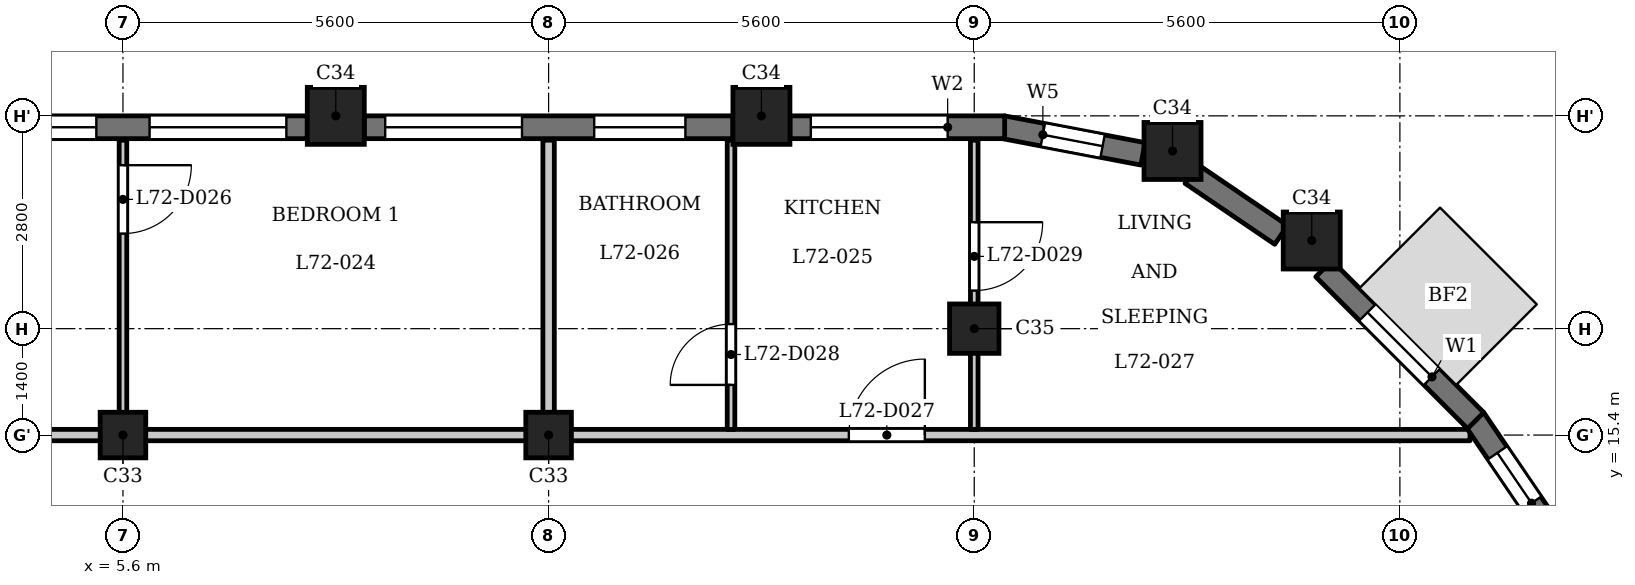
"""IFC4 building model, lengths in metres.
Left out: names, types, materials, properties, quantities, classifications, styles, units other than length and angle.
Written with IfcOpenShell. Run it as: python <this file> out.ifc"""

import sys

from ifc_helpers import new_model, si_unit, direction, frame, frame_2d, origin, origin_2d, place, context, subcontext, project, spatial, rectangle, extrude, element, fill, save


model = new_model("IFC4")
c1 = context("Model", 3, precision=1e-05, world=origin(), true_north=direction((0.0, 1.0)))
c2 = subcontext(c1, "Body", "Model", "MODEL_VIEW")
j1 = project(units=[si_unit("LENGTHUNIT", "METRE"), si_unit("PLANEANGLEUNIT", "RADIAN")], contexts=[c1])
p1 = place(None, origin())
s1 = spatial("IfcSite", under=j1, at=p1, CompositionType="ELEMENT")
p2 = place(p1, origin())
s2 = spatial("IfcBuilding", under=s1, at=p2, CompositionType="ELEMENT")
p3 = place(p2, frame((0.0, 0.0, 276.7)))
s3 = spatial("IfcBuildingStorey", under=s2, at=p3, CompositionType="ELEMENT", Elevation=276.7)
for number, where, z_axis, x_axis in (
    (1, (21.24, 17.96, 0.0), (0.0, 0.0, 1.0), (1.0, 0.0, 0.0)),
    (2, (19.409, 19.138, 0.0), (0.0, 0.0, 1.0), (1.0, 0.0, 0.0)),
    (3, (14.0, 19.6, 0.0), (0.0, 0.0, 1.0), (1.0, 0.0, 0.0)),
    (4, (8.4, 19.6, 0.0), (0.0, 0.0, 1.0), (1.0, 0.0, 0.0)),
):
    element("IfcColumn", number, at=place(p3, frame(where, z_axis=z_axis, x_axis=x_axis)), inside=s3, PredefinedType="COLUMN", context=c2, shape_type="SweptSolid", body=[
        extrude(rectangle(XDim=0.75, YDim=0.75, at=origin_2d()), origin(), (0.0, 0.0, 1.0), 3.5),
    ])
p4 = place(p3, frame((16.8, 16.8, 0.0), z_axis=(0.0, 0.0, 1.0), x_axis=(1.0, 0.0, 0.0)))
e5 = element("IfcColumn", 5, at=p4, inside=s3, PredefinedType="COLUMN", context=c2, shape_type="SweptSolid", body=[
    extrude(rectangle(XDim=0.65, YDim=0.65, at=origin_2d()), origin(), (0.0, 0.0, 1.0), 3.5),
])
for number, where, z_axis, x_axis in (
    (6, (5.6, 15.4, 0.0), (0.0, 0.0, 1.0), (1.0, 0.0, 0.0)),
    (7, (11.2, 15.4, 0.0), (0.0, 0.0, 1.0), (1.0, 0.0, 0.0)),
):
    element("IfcColumn", number, at=place(p3, frame(where, z_axis=z_axis, x_axis=x_axis)), inside=s3, PredefinedType="COLUMN", context=c2, shape_type="SweptSolid", body=[
        extrude(rectangle(XDim=0.6, YDim=0.6, at=origin_2d()), origin(), (0.0, 0.0, 1.0), 3.5),
    ])
p5 = place(p3, frame((24.436, 14.057, 0.0), z_axis=(0.0, 0.0, 1.0), x_axis=(-0.562075713892, 0.827085782645, 0.0)))
e8 = element("IfcWall", 8, at=p5, inside=s3, PredefinedType="SOLIDWALL", context=c2, shape_type="SweptSolid", body=[
    extrude(rectangle(XDim=1.881, YDim=0.3, at=frame_2d((0.94, 0.0))), origin(), (0.0, 0.0, 1.0), 2.55),
])
p6 = place(p5, frame((0.541, 0.0, 0.6)))
e9 = element("IfcOpeningElement", 9, at=p6, cuts=e8, PredefinedType="OPENING", context=c2, shape_type="SweptSolid", body=[
    extrude(rectangle(XDim=0.8, YDim=1.55, at=frame_2d((0.4, 0.775))), frame((0.0, 0.16, 0.0), z_axis=(0.0, -1.0, 0.0), x_axis=(1.0, 0.0, 0.0)), (0.0, 0.0, 1.0), 0.32),
])
p7 = place(p3, frame((23.397, 15.591, 0.0), z_axis=(0.0, 0.0, 1.0), x_axis=(-0.707106781187, 0.707106781187, 0.0)))
e10 = element("IfcWall", 10, at=p7, inside=s3, PredefinedType="SOLIDWALL", context=c2, shape_type="SweptSolid", body=[
    extrude(rectangle(XDim=2.825, YDim=0.3, at=frame_2d((1.413, 0.0))), origin(), (0.0, 0.0, 1.0), 2.55),
])
p8 = place(p7, frame((0.812, 0.0, 0.6)))
e11 = element("IfcOpeningElement", 11, at=p8, cuts=e10, PredefinedType="OPENING", context=c2, shape_type="SweptSolid", body=[
    extrude(rectangle(XDim=1.2, YDim=1.55, at=frame_2d((0.6, 0.775))), frame((0.0, 0.16, 0.0), z_axis=(0.0, -1.0, 0.0), x_axis=(1.0, 0.0, 0.0)), (0.0, 0.0, 1.0), 0.32),
])
p9 = place(p3, frame((20.837, 18.034, 0.0), z_axis=(0.0, 0.0, 1.0), x_axis=(-0.827095130818, 0.562061957952, 0.0)))
e12 = element("IfcWall", 12, at=p9, inside=s3, PredefinedType="SOLIDWALL", context=c2, shape_type="SweptSolid", body=[
    extrude(rectangle(XDim=1.427, YDim=0.3, at=frame_2d((0.713, 0.0))), origin(), (0.0, 0.0, 1.0), 2.55),
])
p10 = place(p3, frame((19.02, 19.1, 0.0), z_axis=(0.0, 0.0, 1.0), x_axis=(-0.982284001233, 0.187398348234, 0.0)))
e13 = element("IfcWall", 13, at=p10, inside=s3, PredefinedType="SOLIDWALL", context=c2, shape_type="SweptSolid", body=[
    extrude(rectangle(XDim=1.881, YDim=0.3, at=frame_2d((0.941, 0.0))), origin(), (0.0, 0.0, 1.0), 2.55),
])
p11 = place(p10, frame((0.541, 0.0, 0.6)))
e14 = element("IfcOpeningElement", 14, at=p11, cuts=e13, PredefinedType="OPENING", context=c2, shape_type="SweptSolid", body=[
    extrude(rectangle(XDim=0.8, YDim=1.55, at=frame_2d((0.4, 0.775))), frame((0.0, 0.16, 0.0), z_axis=(0.0, -1.0, 0.0), x_axis=(1.0, 0.0, 0.0)), (0.0, 0.0, 1.0), 0.32),
])
p12 = place(p3, frame((17.2, 19.45, 0.0), z_axis=(0.0, 0.0, 1.0), x_axis=(-1.0, 0.0, 0.0)))
e15 = element("IfcWall", 15, at=p12, inside=s3, PredefinedType="SOLIDWALL", context=c2, shape_type="SweptSolid", body=[
    extrude(rectangle(XDim=2.825, YDim=0.3, at=frame_2d((1.413, 0.0))), origin(), (0.0, 0.0, 1.0), 2.55),
])
p13 = place(p12, frame((0.75, 0.0, 0.9)))
e16 = element("IfcOpeningElement", 16, at=p13, cuts=e15, PredefinedType="OPENING", context=c2, shape_type="SweptSolid", body=[
    extrude(rectangle(XDim=1.8, YDim=1.25, at=frame_2d((0.9, 0.625))), frame((0.0, 0.16, 0.0), z_axis=(0.0, -1.0, 0.0), x_axis=(1.0, 0.0, 0.0)), (0.0, 0.0, 1.0), 0.32),
])
p14 = place(p3, frame((13.625, 19.45, 0.0), z_axis=(0.0, 0.0, 1.0), x_axis=(-1.0, 0.0, 0.0)))
e17 = element("IfcWall", 17, at=p14, inside=s3, PredefinedType="SOLIDWALL", context=c2, shape_type="SweptSolid", body=[
    extrude(rectangle(XDim=4.85, YDim=0.3, at=frame_2d((2.425, 0.0))), origin(), (0.0, 0.0, 1.0), 2.55),
])
p15 = place(p14, frame((0.625, 0.0, 0.6)))
e18 = element("IfcOpeningElement", 18, at=p15, cuts=e17, PredefinedType="OPENING", context=c2, shape_type="SweptSolid", body=[
    extrude(rectangle(XDim=1.2, YDim=1.55, at=frame_2d((0.6, 0.775))), frame((0.0, 0.16, 0.0), z_axis=(0.0, -1.0, 0.0), x_axis=(1.0, 0.0, 0.0)), (0.0, 0.0, 1.0), 0.32),
])
p16 = place(p14, frame((2.775, 0.0, 0.9)))
e19 = element("IfcOpeningElement", 19, at=p16, cuts=e17, PredefinedType="OPENING", context=c2, shape_type="SweptSolid", body=[
    extrude(rectangle(XDim=1.8, YDim=1.25, at=frame_2d((0.9, 0.625))), frame((0.0, 0.16, 0.0), z_axis=(0.0, -1.0, 0.0), x_axis=(1.0, 0.0, 0.0)), (0.0, 0.0, 1.0), 0.32),
])
p17 = place(p3, frame((8.025, 19.45, 0.0), z_axis=(0.0, 0.0, 1.0), x_axis=(-1.0, 0.0, 0.0)))
e20 = element("IfcWall", 20, at=p17, inside=s3, PredefinedType="SOLIDWALL", context=c2, shape_type="SweptSolid", body=[
    extrude(rectangle(XDim=4.85, YDim=0.3, at=frame_2d((2.425, 0.0))), origin(), (0.0, 0.0, 1.0), 2.55),
])
p18 = place(p17, frame((0.275, 0.0, 0.9)))
e21 = element("IfcOpeningElement", 21, at=p18, cuts=e20, PredefinedType="OPENING", context=c2, shape_type="SweptSolid", body=[
    extrude(rectangle(XDim=1.8, YDim=1.25, at=frame_2d((0.9, 0.625))), frame((0.0, 0.16, 0.0), z_axis=(0.0, -1.0, 0.0), x_axis=(1.0, 0.0, 0.0)), (0.0, 0.0, 1.0), 0.32),
])
p19 = place(p17, frame((2.775, 0.0, 0.9)))
e22 = element("IfcOpeningElement", 22, at=p19, cuts=e20, PredefinedType="OPENING", context=c2, shape_type="SweptSolid", body=[
    extrude(rectangle(XDim=1.8, YDim=1.25, at=frame_2d((0.9, 0.625))), frame((0.0, 0.16, 0.0), z_axis=(0.0, -1.0, 0.0), x_axis=(1.0, 0.0, 0.0)), (0.0, 0.0, 1.0), 0.32),
])
p20 = place(p3, frame((-23.55, 15.4, 0.0), z_axis=(0.0, 0.0, 1.0), x_axis=(1.0, 0.0, 0.0)))
e23 = element("IfcWall", 23, at=p20, inside=s3, PredefinedType="PARTITIONING", context=c2, shape_type="SweptSolid", body=[
    extrude(rectangle(XDim=46.872, YDim=0.15, at=frame_2d((23.436, 0.0))), origin(), (0.0, 0.0, 1.0), 3.2),
])
p21 = place(p20, frame((13.9, 0.0, 0.0)))
e24 = element("IfcOpeningElement", 24, at=p21, cuts=e23, PredefinedType="OPENING", context=c2, shape_type="SweptSolid", body=[
    extrude(rectangle(XDim=1.0, YDim=2.1, at=frame_2d((0.5, 1.05))), frame((0.0, 0.085, 0.0), z_axis=(0.0, -1.0, 0.0), x_axis=(1.0, 0.0, 0.0)), (0.0, 0.0, 1.0), 0.17),
])
p22 = place(p20, frame((21.9, 0.0, 0.0)))
e25 = element("IfcOpeningElement", 25, at=p22, cuts=e23, PredefinedType="OPENING", context=c2, shape_type="SweptSolid", body=[
    extrude(rectangle(XDim=1.0, YDim=2.1, at=frame_2d((0.5, 1.05))), frame((0.0, 0.085, 0.0), z_axis=(0.0, -1.0, 0.0), x_axis=(1.0, 0.0, 0.0)), (0.0, 0.0, 1.0), 0.17),
])
p23 = place(p20, frame((38.7, 0.0, 0.0)))
e26 = element("IfcOpeningElement", 26, at=p23, cuts=e23, PredefinedType="OPENING", context=c2, shape_type="SweptSolid", body=[
    extrude(rectangle(XDim=1.0, YDim=2.1, at=frame_2d((0.5, 1.05))), frame((0.0, 0.085, 0.0), z_axis=(0.0, -1.0, 0.0), x_axis=(1.0, 0.0, 0.0)), (0.0, 0.0, 1.0), 0.17),
])
p24 = place(p3, frame((5.6, 15.475, 0.0), z_axis=(0.0, 0.0, 1.0), x_axis=(0.0, 1.0, 0.0)))
e27 = element("IfcWall", 27, at=p24, inside=s3, PredefinedType="PARTITIONING", context=c2, shape_type="SweptSolid", body=[
    extrude(rectangle(XDim=3.805, YDim=0.1, at=frame_2d((1.902, 0.0))), origin(), (0.0, 0.0, 1.0), 3.2),
])
p25 = place(p24, frame((2.576, 0.0, 0.0)))
e28 = element("IfcOpeningElement", 28, at=p25, cuts=e27, PredefinedType="OPENING", context=c2, shape_type="SweptSolid", body=[
    extrude(rectangle(XDim=0.9, YDim=2.1, at=frame_2d((0.45, 1.05))), frame((0.0, 0.06, 0.0), z_axis=(0.0, -1.0, 0.0), x_axis=(1.0, 0.0, 0.0)), (0.0, 0.0, 1.0), 0.12),
])
p26 = place(p3, frame((11.2, 15.475, 0.0), z_axis=(0.0, 0.0, 1.0), x_axis=(0.0, 1.0, 0.0)))
e29 = element("IfcWall", 29, at=p26, inside=s3, PredefinedType="PARTITIONING", context=c2, shape_type="SweptSolid", body=[
    extrude(rectangle(XDim=3.805, YDim=0.15, at=frame_2d((1.902, 0.0))), origin(), (0.0, 0.0, 1.0), 3.2),
])
p27 = place(p3, frame((13.6, 15.475, 0.0), z_axis=(0.0, 0.0, 1.0), x_axis=(0.0, 1.0, 0.0)))
e30 = element("IfcWall", 30, at=p27, inside=s3, PredefinedType="PARTITIONING", context=c2, shape_type="SweptSolid", body=[
    extrude(rectangle(XDim=3.805, YDim=0.1, at=frame_2d((1.902, 0.0))), origin(), (0.0, 0.0, 1.0), 3.2),
])
p28 = place(p27, frame((0.585, 0.0, 0.0)))
e31 = element("IfcOpeningElement", 31, at=p28, cuts=e30, PredefinedType="OPENING", context=c2, shape_type="SweptSolid", body=[
    extrude(rectangle(XDim=0.8, YDim=2.1, at=frame_2d((0.4, 1.05))), frame((0.0, 0.06, 0.0), z_axis=(0.0, -1.0, 0.0), x_axis=(1.0, 0.0, 0.0)), (0.0, 0.0, 1.0), 0.12),
])
p29 = place(p3, frame((16.8, 15.475, 0.0), z_axis=(0.0, 0.0, 1.0), x_axis=(0.0, 1.0, 0.0)))
e32 = element("IfcWall", 32, at=p29, inside=s3, PredefinedType="PARTITIONING", context=c2, shape_type="SweptSolid", body=[
    extrude(rectangle(XDim=3.805, YDim=0.1, at=frame_2d((1.902, 0.0))), origin(), (0.0, 0.0, 1.0), 3.2),
])
p30 = place(p29, frame((1.826, 0.0, 0.0)))
e33 = element("IfcOpeningElement", 33, at=p30, cuts=e32, PredefinedType="OPENING", context=c2, shape_type="SweptSolid", body=[
    extrude(rectangle(XDim=0.9, YDim=2.1, at=frame_2d((0.45, 1.05))), frame((0.0, 0.06, 0.0), z_axis=(0.0, -1.0, 0.0), x_axis=(1.0, 0.0, 0.0)), (0.0, 0.0, 1.0), 0.12),
])
p31 = place(p25, origin())
e34 = element("IfcDoor", 34, at=p31, inside=s3, OperationType="SINGLE_SWING_RIGHT", PredefinedType="DOOR", context=c2, shape_type="SweptSolid", body=[
    extrude(rectangle(XDim=0.9, YDim=2.1, at=frame_2d((0.45, 1.05))), frame((0.0, 0.025, 0.0), z_axis=(0.0, -1.0, 0.0), x_axis=(1.0, 0.0, 0.0)), (0.0, 0.0, 1.0), 0.05),
])
fill(e28, e34)
p32 = place(p23, origin())
e35 = element("IfcDoor", 35, at=p32, inside=s3, OperationType="SINGLE_SWING_LEFT", PredefinedType="DOOR", context=c2, shape_type="SweptSolid", body=[
    extrude(rectangle(XDim=1.0, YDim=2.1, at=frame_2d((0.5, 1.05))), frame((0.0, 0.025, 0.0), z_axis=(0.0, -1.0, 0.0), x_axis=(1.0, 0.0, 0.0)), (0.0, 0.0, 1.0), 0.05),
])
fill(e26, e35)
p33 = place(p28, origin())
e36 = element("IfcDoor", 36, at=p33, inside=s3, OperationType="SINGLE_SWING_RIGHT", PredefinedType="DOOR", context=c2, shape_type="SweptSolid", body=[
    extrude(rectangle(XDim=0.8, YDim=2.1, at=frame_2d((0.4, 1.05))), frame((0.0, 0.025, 0.0), z_axis=(0.0, -1.0, 0.0), x_axis=(1.0, 0.0, 0.0)), (0.0, 0.0, 1.0), 0.05),
])
fill(e31, e36)
p34 = place(p30, origin())
e37 = element("IfcDoor", 37, at=p34, inside=s3, OperationType="SINGLE_SWING_RIGHT", PredefinedType="DOOR", context=c2, shape_type="SweptSolid", body=[
    extrude(rectangle(XDim=0.9, YDim=2.1, at=frame_2d((0.45, 1.05))), frame((0.0, 0.025, 0.0), z_axis=(0.0, -1.0, 0.0), x_axis=(1.0, 0.0, 0.0)), (0.0, 0.0, 1.0), 0.05),
])
fill(e33, e37)
p35 = place(p6, origin())
e38 = element("IfcWindow", 38, at=p35, inside=s3, PartitioningType="SINGLE_PANEL", PredefinedType="WINDOW", context=c2, shape_type="SweptSolid", body=[
    extrude(rectangle(XDim=0.8, YDim=1.55, at=frame_2d((0.4, 0.775))), frame((0.0, 0.03, 0.0), z_axis=(0.0, -1.0, 0.0), x_axis=(1.0, 0.0, 0.0)), (0.0, 0.0, 1.0), 0.06),
])
fill(e9, e38)
p36 = place(p8, origin())
e39 = element("IfcWindow", 39, at=p36, inside=s3, PartitioningType="SINGLE_PANEL", PredefinedType="WINDOW", context=c2, shape_type="SweptSolid", body=[
    extrude(rectangle(XDim=1.2, YDim=1.55, at=frame_2d((0.6, 0.775))), frame((0.0, 0.03, 0.0), z_axis=(0.0, -1.0, 0.0), x_axis=(1.0, 0.0, 0.0)), (0.0, 0.0, 1.0), 0.06),
])
fill(e11, e39)
p37 = place(p11, origin())
e40 = element("IfcWindow", 40, at=p37, inside=s3, PartitioningType="SINGLE_PANEL", PredefinedType="WINDOW", context=c2, shape_type="SweptSolid", body=[
    extrude(rectangle(XDim=0.8, YDim=1.55, at=frame_2d((0.4, 0.775))), frame((0.0, 0.03, 0.0), z_axis=(0.0, -1.0, 0.0), x_axis=(1.0, 0.0, 0.0)), (0.0, 0.0, 1.0), 0.06),
])
fill(e14, e40)
p38 = place(p13, origin())
e41 = element("IfcWindow", 41, at=p38, inside=s3, PartitioningType="SINGLE_PANEL", PredefinedType="WINDOW", context=c2, shape_type="SweptSolid", body=[
    extrude(rectangle(XDim=1.8, YDim=1.25, at=frame_2d((0.9, 0.625))), frame((0.0, 0.03, 0.0), z_axis=(0.0, -1.0, 0.0), x_axis=(1.0, 0.0, 0.0)), (0.0, 0.0, 1.0), 0.06),
])
fill(e16, e41)
p39 = place(p15, origin())
e42 = element("IfcWindow", 42, at=p39, inside=s3, PartitioningType="SINGLE_PANEL", PredefinedType="WINDOW", context=c2, shape_type="SweptSolid", body=[
    extrude(rectangle(XDim=1.2, YDim=1.55, at=frame_2d((0.6, 0.775))), frame((0.0, 0.03, 0.0), z_axis=(0.0, -1.0, 0.0), x_axis=(1.0, 0.0, 0.0)), (0.0, 0.0, 1.0), 0.06),
])
fill(e18, e42)
p40 = place(p16, origin())
e43 = element("IfcWindow", 43, at=p40, inside=s3, PartitioningType="SINGLE_PANEL", PredefinedType="WINDOW", context=c2, shape_type="SweptSolid", body=[
    extrude(rectangle(XDim=1.8, YDim=1.25, at=frame_2d((0.9, 0.625))), frame((0.0, 0.03, 0.0), z_axis=(0.0, -1.0, 0.0), x_axis=(1.0, 0.0, 0.0)), (0.0, 0.0, 1.0), 0.06),
])
fill(e19, e43)
p41 = place(p18, origin())
e44 = element("IfcWindow", 44, at=p41, inside=s3, PartitioningType="SINGLE_PANEL", PredefinedType="WINDOW", context=c2, shape_type="SweptSolid", body=[
    extrude(rectangle(XDim=1.8, YDim=1.25, at=frame_2d((0.9, 0.625))), frame((0.0, 0.03, 0.0), z_axis=(0.0, -1.0, 0.0), x_axis=(1.0, 0.0, 0.0)), (0.0, 0.0, 1.0), 0.06),
])
fill(e21, e44)
p42 = place(p19, origin())
e45 = element("IfcWindow", 45, at=p42, inside=s3, PartitioningType="SINGLE_PANEL", PredefinedType="WINDOW", context=c2, shape_type="SweptSolid", body=[
    extrude(rectangle(XDim=1.8, YDim=1.25, at=frame_2d((0.9, 0.625))), frame((0.0, 0.03, 0.0), z_axis=(0.0, -1.0, 0.0), x_axis=(1.0, 0.0, 0.0)), (0.0, 0.0, 1.0), 0.06),
])
fill(e22, e45)
save(model, sys.argv[1])
